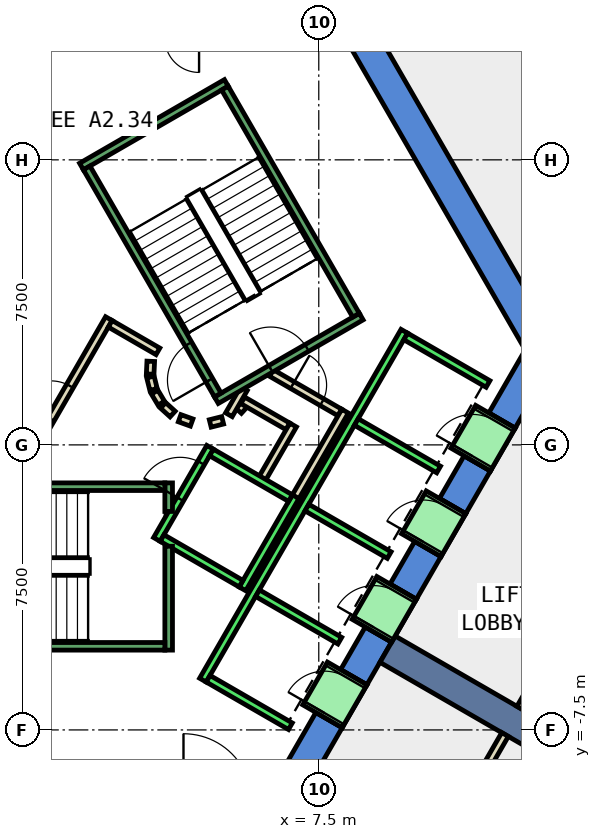
"""IFC4 building model, lengths in metres.
Left out: names, types, materials, properties, quantities, classifications, styles, units other than length and angle.
Written with IfcOpenShell. Run it as: python <this file> out.ifc"""

import sys

from ifc_helpers import new_model, si_unit, direction, frame, frame_2d, origin, place, context, subcontext, project, spatial, polyline, rectangle, outline, extrude, element, fill, save


model = new_model("IFC4")
c1 = context("Model", 3, precision=1e-05, world=origin(), true_north=direction((0.0, 1.0)))
c2 = subcontext(c1, "Body", "Model", "MODEL_VIEW")
j1 = project(units=[si_unit("LENGTHUNIT", "METRE"), si_unit("PLANEANGLEUNIT", "RADIAN")], contexts=[c1])
p1 = place(None, origin())
s1 = spatial("IfcSite", under=j1, at=p1, CompositionType="ELEMENT")
p2 = place(p1, origin())
s2 = spatial("IfcBuilding", under=s1, at=p2, CompositionType="ELEMENT")
p3 = place(p2, frame((0.0, 0.0, 167.6)))
s3 = spatial("IfcBuildingStorey", under=s2, at=p3, CompositionType="ELEMENT", Elevation=167.6)
p4 = place(p3, frame((0.0, 0.0, -0.4)))
e1 = element("IfcWall", 1, at=p4, inside=s3, PredefinedType="SHEAR", context=c2, shape_type="SweptSolid", body=[
    extrude(outline(polyline([(8.517, 11.748), (7.824, 11.348), (12.933, 2.5), (13.856, 2.5), (8.517, 11.748)])), origin(), (0.0, 0.0, 1.0), 4.2),
])
p5 = place(p3, frame((0.0, 0.0, -0.4)))
e2 = element("IfcWall", 2, at=p5, inside=s3, PredefinedType="SHEAR", context=c2, shape_type="SweptSolid", body=[
    extrude(outline(polyline([(8.117, -7.44), (7.424, -7.04), (6.466, -8.7), (6.928, -9.5), (8.117, -7.44)])), origin(), (0.0, 0.0, 1.0), 4.2),
])
p6 = place(p3, frame((0.0, 0.0, -0.4)))
e3 = element("IfcWall", 3, at=p6, inside=s3, PredefinedType="SHEAR", context=c2, shape_type="SweptSolid", body=[
    extrude(outline(polyline([(9.417, -5.189), (8.724, -4.789), (8.075, -5.914), (8.767, -6.314), (9.417, -5.189)])), origin(), (0.0, 0.0, 1.0), 4.2),
])
p7 = place(p3, frame((0.0, 0.0, -0.4)))
e4 = element("IfcWall", 4, at=p7, inside=s3, PredefinedType="SHEAR", context=c2, shape_type="SweptSolid", body=[
    extrude(outline(polyline([(10.717, -2.937), (10.025, -2.537), (9.374, -3.663), (10.067, -4.063), (10.717, -2.937)])), origin(), (0.0, 0.0, 1.0), 4.2),
])
p8 = place(p3, frame((0.0, 0.0, -0.4)))
e5 = element("IfcWall", 5, at=p8, inside=s3, PredefinedType="SHEAR", context=c2, shape_type="SweptSolid", body=[
    extrude(outline(polyline([(12.017, -0.686), (11.324, -0.286), (10.675, -1.411), (11.367, -1.811), (12.017, -0.686)])), origin(), (0.0, 0.0, 1.0), 4.2),
])
p9 = place(p3, frame((0.0, 0.0, -0.4)))
e6 = element("IfcWall", 6, at=p9, inside=s3, PredefinedType="SHEAR", context=c2, shape_type="SweptSolid", body=[
    extrude(outline(polyline([(11.974, 0.84), (12.667, 0.44), (13.856, 2.5), (12.933, 2.5), (11.974, 0.84)])), origin(), (0.0, 0.0, 1.0), 4.2),
])
p10 = place(p3, frame((0.0, 0.0, 3.6)))
e7 = element("IfcWall", 7, at=p10, inside=s3, PredefinedType="SHEAR", context=c2, shape_type="SweptSolid", body=[
    extrude(outline(polyline([(8.767, -6.314), (8.075, -5.914), (7.424, -7.04), (8.117, -7.44), (8.767, -6.314)])), origin(), (0.0, 0.0, 1.0), 0.2),
])
p11 = place(p3, frame((0.0, 0.0, 3.6)))
e8 = element("IfcWall", 8, at=p11, inside=s3, PredefinedType="SHEAR", context=c2, shape_type="SweptSolid", body=[
    extrude(outline(polyline([(10.067, -4.063), (9.374, -3.663), (8.724, -4.789), (9.417, -5.189), (10.067, -4.063)])), origin(), (0.0, 0.0, 1.0), 0.2),
])
p12 = place(p3, frame((0.0, 0.0, 3.6)))
e9 = element("IfcWall", 9, at=p12, inside=s3, PredefinedType="SHEAR", context=c2, shape_type="SweptSolid", body=[
    extrude(outline(polyline([(11.367, -1.811), (10.675, -1.411), (10.025, -2.537), (10.717, -2.937), (11.367, -1.811)])), origin(), (0.0, 0.0, 1.0), 0.2),
])
p13 = place(p3, frame((0.0, 0.0, 3.6)))
e10 = element("IfcWall", 10, at=p13, inside=s3, PredefinedType="SHEAR", context=c2, shape_type="SweptSolid", body=[
    extrude(outline(polyline([(12.667, 0.44), (11.974, 0.84), (11.324, -0.286), (12.017, -0.686), (12.667, 0.44)])), origin(), (0.0, 0.0, 1.0), 0.2),
])
p14 = place(p3, frame((9.31, -5.375, -0.4), z_axis=(0.0, 0.0, 1.0), x_axis=(0.866017533419, -0.500013631625, 0.0)))
e11 = element("IfcWall", 11, at=p14, inside=s3, PredefinedType="SHEAR", context=c2, shape_type="SweptSolid", body=[
    extrude(rectangle(XDim=9.0, YDim=0.8, at=frame_2d((4.5, 0.0))), origin(), (0.0, 0.0, 1.0), 4.2),
])
p15 = place(p3, frame((5.39, 0.898, 0.0), z_axis=(0.0, 0.0, 1.0), x_axis=(0.673828488714, 0.738887791073, 0.0)))
e12 = element("IfcWall", 12, at=p15, inside=s3, PredefinedType="PARTITIONING", context=c2, shape_type="SweptSolid", body=[
    extrude(rectangle(XDim=0.263, YDim=0.2, at=frame_2d((0.131, 0.0))), origin(), (0.0, 0.0, 1.0), 3.8),
])
p16 = place(p3, frame((5.499, 1.172, 0.0), z_axis=(0.0, 0.0, 1.0), x_axis=(0.866333505267, -0.499465972466, 0.0)))
e13 = element("IfcWall", 13, at=p16, inside=s3, PredefinedType="PARTITIONING", context=c2, shape_type="SweptSolid", body=[
    extrude(rectangle(XDim=1.374, YDim=0.2, at=frame_2d((0.687, 0.0))), origin(), (0.0, 0.0, 1.0), 3.8),
])
p17 = place(p3, frame((6.826, 0.522, 0.0), z_axis=(0.0, 0.0, 1.0), x_axis=(-0.500016722714, -0.866015748706, 0.0)))
e14 = element("IfcWall", 14, at=p17, inside=s3, PredefinedType="PARTITIONING", context=c2, shape_type="SweptSolid", body=[
    extrude(rectangle(XDim=1.7, YDim=0.2, at=frame_2d((0.85, 0.0))), origin(), (0.0, 0.0, 1.0), 3.8),
])
p18 = place(p3, frame((6.25, 1.894, 0.0), z_axis=(0.0, 0.0, 1.0), x_axis=(0.866043184279, -0.499969202016, 0.0)))
e15 = element("IfcWall", 15, at=p18, inside=s3, PredefinedType="PARTITIONING", context=c2, shape_type="SweptSolid", body=[
    extrude(rectangle(XDim=2.084, YDim=0.2, at=frame_2d((1.042, 0.0))), origin(), (0.0, 0.0, 1.0), 3.8),
])
p19 = place(p18, frame((0.642, 0.0, 0.0)))
e16 = element("IfcOpeningElement", 16, at=p19, cuts=e15, PredefinedType="OPENING", context=c2, shape_type="SweptSolid", body=[
    extrude(rectangle(XDim=0.9, YDim=2.1, at=frame_2d((0.45, 1.05))), frame((0.0, 0.11, 0.0), z_axis=(0.0, -1.0, 0.0), x_axis=(1.0, 0.0, 0.0)), (0.0, 0.0, 1.0), 0.22),
])
p20 = place(p3, frame((8.192, 0.888, 0.0), z_axis=(0.0, 0.0, 1.0), x_axis=(-0.499940625693, -0.866059680843, 0.0)))
e17 = element("IfcWall", 17, at=p20, inside=s3, PredefinedType="PARTITIONING", context=c2, shape_type="SweptSolid", body=[
    extrude(rectangle(XDim=2.68, YDim=0.2, at=frame_2d((1.34, 0.0))), origin(), (0.0, 0.0, 1.0), 3.8),
])
p21 = place(p3, frame((5.135, 0.793, 0.0), z_axis=(0.0, 0.0, 1.0), x_axis=(0.499526442893, 0.866298639529, 0.0)))
e18 = element("IfcWall", 18, at=p21, inside=s3, PredefinedType="PARTITIONING", context=c2, shape_type="SweptSolid", body=[
    extrude(rectangle(XDim=0.791, YDim=0.2, at=frame_2d((0.396, 0.0))), origin(), (0.0, 0.0, 1.0), 3.8),
])
p22 = place(p3, frame((-0.52, -1.0, 0.0), z_axis=(0.0, 0.0, 1.0), x_axis=(0.50011622646, 0.865958290007, 0.0)))
e19 = element("IfcWall", 19, at=p22, inside=s3, PredefinedType="PARTITIONING", context=c2, shape_type="SweptSolid", body=[
    extrude(rectangle(XDim=4.991, YDim=0.2, at=frame_2d((2.496, 0.0))), origin(), (0.0, 0.0, 1.0), 3.8),
])
p23 = place(p22, frame((1.945, 0.0, 0.0)))
e20 = element("IfcOpeningElement", 20, at=p23, cuts=e19, PredefinedType="OPENING", context=c2, shape_type="SweptSolid", body=[
    extrude(rectangle(XDim=1.0, YDim=2.1, at=frame_2d((0.5, 1.05))), frame((0.0, 0.11, 0.0), z_axis=(0.0, -1.0, 0.0), x_axis=(1.0, 0.0, 0.0)), (0.0, 0.0, 1.0), 0.22),
])
p24 = place(p3, frame((2.012, 3.186, 0.0), z_axis=(0.0, 0.0, 1.0), x_axis=(0.865891012941, -0.500232699559, 0.0)))
e21 = element("IfcWall", 21, at=p24, inside=s3, PredefinedType="PARTITIONING", context=c2, shape_type="SweptSolid", body=[
    extrude(rectangle(XDim=1.449, YDim=0.2, at=frame_2d((0.725, 0.0))), origin(), (0.0, 0.0, 1.0), 3.8),
])
p25 = place(p3, frame((3.079, 2.199, 0.0), z_axis=(0.0, 0.0, 1.0), x_axis=(-0.047771483479, -0.998858290933, 0.0)))
e22 = element("IfcWall", 22, at=p25, inside=s3, PredefinedType="PARTITIONING", context=c2, shape_type="SweptSolid", body=[
    extrude(rectangle(XDim=0.337, YDim=0.2, at=frame_2d((0.169, 0.0))), origin(), (0.0, 0.0, 1.0), 3.8),
])
p26 = place(p3, frame((3.07, 1.786, 0.0), z_axis=(0.0, 0.0, 1.0), x_axis=(0.242705583207, -0.970099994784, 0.0)))
e23 = element("IfcWall", 23, at=p26, inside=s3, PredefinedType="PARTITIONING", context=c2, shape_type="SweptSolid", body=[
    extrude(rectangle(XDim=0.338, YDim=0.2, at=frame_2d((0.169, 0.0))), origin(), (0.0, 0.0, 1.0), 3.8),
])
for number, where, z_axis, x_axis in (
    (24, (3.182, 1.388, 0.0), (0.0, 0.0, 1.0), (0.512, -0.859, 0.0)),
    (25, (3.404, 1.039, 0.0), (0.0, 0.0, 1.0), (0.74, -0.672, 0.0)),
):
    element("IfcWall", number, at=place(p3, frame(where, z_axis=z_axis, x_axis=x_axis)), inside=s3, PredefinedType="PARTITIONING", context=c2, shape_type="SweptSolid", body=[
        extrude(rectangle(XDim=0.338, YDim=0.2, at=frame_2d((0.169, 0.0))), origin(), (0.0, 0.0, 1.0), 3.8),
    ])
p27 = place(p3, frame((3.838, 0.702, 0.0), z_axis=(0.0, 0.0, 1.0), x_axis=(0.941035081519, -0.338308993895, 0.0)))
e26 = element("IfcWall", 26, at=p27, inside=s3, PredefinedType="PARTITIONING", context=c2, shape_type="SweptSolid", body=[
    extrude(rectangle(XDim=0.337, YDim=0.2, at=frame_2d((0.168, 0.0))), origin(), (0.0, 0.0, 1.0), 3.8),
])
p28 = place(p3, frame((4.644, 0.564, 0.0), z_axis=(0.0, 0.0, 1.0), x_axis=(0.969929076366, 0.243387729394, 0.0)))
e27 = element("IfcWall", 27, at=p28, inside=s3, PredefinedType="PARTITIONING", context=c2, shape_type="SweptSolid", body=[
    extrude(rectangle(XDim=0.337, YDim=0.2, at=frame_2d((0.168, 0.0))), origin(), (0.0, 0.0, 1.0), 3.8),
])
p29 = place(p3, frame((18.0, 2.077, 0.0), z_axis=(0.0, 0.0, 1.0), x_axis=(-0.499959557847, -0.866048751813, 0.0)))
e28 = element("IfcWall", 28, at=p29, inside=s3, PredefinedType="PARTITIONING", context=c2, shape_type="SweptSolid", body=[
    extrude(rectangle(XDim=10.399, YDim=0.2, at=frame_2d((5.199, 0.0))), origin(), (0.0, 0.0, 1.0), 3.8),
])
p30 = place(p3, frame((12.401, -7.621, 0.0), z_axis=(0.0, 0.0, 1.0), x_axis=(-0.499983724212, -0.866034800411, 0.0)))
e29 = element("IfcWall", 29, at=p30, inside=s3, PredefinedType="PARTITIONING", context=c2, shape_type="SweptSolid", body=[
    extrude(rectangle(XDim=9.302, YDim=0.2, at=frame_2d((4.651, 0.0))), origin(), (0.0, 0.0, 1.0), 3.8),
])
p31 = place(p3, frame((3.24, -2.488, 0.0), z_axis=(0.0, 0.0, 1.0), x_axis=(0.49994636267, 0.866056369097, 0.0)))
e30 = element("IfcWall", 30, at=p31, inside=s3, PredefinedType="STANDARD", context=c2, shape_type="SweptSolid", body=[
    extrude(rectangle(XDim=2.8, YDim=0.2, at=frame_2d((1.4, 0.0))), origin(), (0.0, 0.0, 1.0), 3.8),
])
p32 = place(p31, frame((1.225, 0.0, 0.0)))
e31 = element("IfcOpeningElement", 31, at=p32, cuts=e30, PredefinedType="OPENING", context=c2, shape_type="SweptSolid", body=[
    extrude(rectangle(XDim=1.1, YDim=2.1, at=frame_2d((0.55, 1.05))), frame((0.0, 0.11, 0.0), z_axis=(0.0, -1.0, 0.0), x_axis=(1.0, 0.0, 0.0)), (0.0, 0.0, 1.0), 0.22),
])
p33 = place(p3, frame((5.492, -3.788, 0.0), z_axis=(0.0, 0.0, 1.0), x_axis=(0.500011755427, 0.866018616679, 0.0)))
e32 = element("IfcWall", 32, at=p33, inside=s3, PredefinedType="STANDARD", context=c2, shape_type="SweptSolid", body=[
    extrude(rectangle(XDim=2.8, YDim=0.2, at=frame_2d((1.4, 0.0))), origin(), (0.0, 0.0, 1.0), 3.8),
])
p34 = place(p3, frame((3.377, -2.452, 0.0), z_axis=(0.0, 0.0, 1.0), x_axis=(0.865955154139, -0.50012165622, 0.0)))
e33 = element("IfcWall", 33, at=p34, inside=s3, PredefinedType="STANDARD", context=c2, shape_type="SweptSolid", body=[
    extrude(rectangle(XDim=2.4, YDim=0.2, at=frame_2d((1.2, 0.0))), origin(), (0.0, 0.0, 1.0), 3.8),
])
p35 = place(p3, frame((4.677, -0.2, 0.0), z_axis=(0.0, 0.0, 1.0), x_axis=(0.865973769406, -0.500089422704, 0.0)))
e34 = element("IfcWall", 34, at=p35, inside=s3, PredefinedType="STANDARD", context=c2, shape_type="SweptSolid", body=[
    extrude(rectangle(XDim=2.399, YDim=0.2, at=frame_2d((1.2, 0.0))), origin(), (0.0, 0.0, 1.0), 3.8),
])
p36 = place(p3, frame((4.451, -6.19, 0.0), z_axis=(0.0, 0.0, 1.0), x_axis=(0.50000090737, 0.866024879913, 0.0)))
e35 = element("IfcWall", 35, at=p36, inside=s3, PredefinedType="STANDARD", context=c2, shape_type="SweptSolid", body=[
    extrude(rectangle(XDim=10.6, YDim=0.2, at=frame_2d((5.3, 0.0))), origin(), (0.0, 0.0, 1.0), 3.8),
])
for number, where, z_axis, x_axis in (
    (36, (4.588, -6.153, 0.0), (0.0, 0.0, 1.0), (0.866, -0.5, 0.0)),
    (37, (5.888, -3.902, 0.0), (0.0, 0.0, 1.0), (0.866, -0.5, 0.0)),
    (38, (7.188, -1.65, 0.0), (0.0, 0.0, 1.0), (0.866, -0.5, 0.0)),
    (39, (8.488, 0.602, 0.0), (0.0, 0.0, 1.0), (0.866, -0.5, 0.0)),
):
    element("IfcWall", number, at=place(p3, frame(where, z_axis=z_axis, x_axis=x_axis)), inside=s3, PredefinedType="STANDARD", context=c2, shape_type="SweptSolid", body=[
        extrude(rectangle(XDim=2.5, YDim=0.2, at=frame_2d((1.25, 0.0))), origin(), (0.0, 0.0, 1.0), 3.8),
    ])
p37 = place(p3, frame((9.788, 2.853, 0.0), z_axis=(0.0, 0.0, 1.0), x_axis=(0.865998541277, -0.500046524342, 0.0)))
e40 = element("IfcWall", 40, at=p37, inside=s3, PredefinedType="STANDARD", context=c2, shape_type="SweptSolid", body=[
    extrude(rectangle(XDim=2.5, YDim=0.2, at=frame_2d((1.25, 0.0))), origin(), (0.0, 0.0, 1.0), 3.8),
])
p38 = place(p3, frame((7.598, -7.14, 0.0), z_axis=(0.0, 0.0, 1.0), x_axis=(0.500362116554, 0.865816234728, 0.0)))
e41 = element("IfcWall", 41, at=p38, inside=s3, PredefinedType="STANDARD", context=c2, shape_type="SweptSolid", body=[
    extrude(rectangle(XDim=1.299, YDim=1.2, at=frame_2d((0.65, 0.0))), origin(), (0.0, 0.0, 1.0), 2.4),
])
p39 = place(p38, frame((0.1, 0.0, 0.0)))
e42 = element("IfcOpeningElement", 42, at=p39, cuts=e41, PredefinedType="OPENING", context=c2, shape_type="SweptSolid", body=[
    extrude(rectangle(XDim=1.1, YDim=2.3, at=frame_2d((0.55, 1.15))), frame((0.0, 0.61, 0.0), z_axis=(0.0, -1.0, 0.0), x_axis=(1.0, 0.0, 0.0)), (0.0, 0.0, 1.0), 1.22),
])
p40 = place(p3, frame((8.898, -4.889, 0.0), z_axis=(0.0, 0.0, 1.0), x_axis=(0.500036693733, 0.866004217611, 0.0)))
e43 = element("IfcWall", 43, at=p40, inside=s3, PredefinedType="STANDARD", context=c2, shape_type="SweptSolid", body=[
    extrude(rectangle(XDim=1.3, YDim=1.2, at=frame_2d((0.65, 0.0))), origin(), (0.0, 0.0, 1.0), 2.4),
])
p41 = place(p40, frame((0.1, 0.0, 0.0)))
e44 = element("IfcOpeningElement", 44, at=p41, cuts=e43, PredefinedType="OPENING", context=c2, shape_type="SweptSolid", body=[
    extrude(rectangle(XDim=1.1, YDim=2.3, at=frame_2d((0.55, 1.15))), frame((0.0, 0.61, 0.0), z_axis=(0.0, -1.0, 0.0), x_axis=(1.0, 0.0, 0.0)), (0.0, 0.0, 1.0), 1.22),
])
p42 = place(p3, frame((10.198, -2.637, 0.0), z_axis=(0.0, 0.0, 1.0), x_axis=(0.49989585183, 0.866085525409, 0.0)))
e45 = element("IfcWall", 45, at=p42, inside=s3, PredefinedType="STANDARD", context=c2, shape_type="SweptSolid", body=[
    extrude(rectangle(XDim=1.3, YDim=1.2, at=frame_2d((0.65, 0.0))), origin(), (0.0, 0.0, 1.0), 2.4),
])
p43 = place(p42, frame((0.1, 0.0, 0.0)))
e46 = element("IfcOpeningElement", 46, at=p43, cuts=e45, PredefinedType="OPENING", context=c2, shape_type="SweptSolid", body=[
    extrude(rectangle(XDim=1.1, YDim=2.3, at=frame_2d((0.55, 1.15))), frame((0.0, 0.61, 0.0), z_axis=(0.0, -1.0, 0.0), x_axis=(1.0, 0.0, 0.0)), (0.0, 0.0, 1.0), 1.22),
])
p44 = place(p3, frame((11.498, -0.385, 0.0), z_axis=(0.0, 0.0, 1.0), x_axis=(0.500221244143, 0.865897630733, 0.0)))
e47 = element("IfcWall", 47, at=p44, inside=s3, PredefinedType="STANDARD", context=c2, shape_type="SweptSolid", body=[
    extrude(rectangle(XDim=1.299, YDim=1.2, at=frame_2d((0.65, 0.0))), origin(), (0.0, 0.0, 1.0), 2.4),
])
p45 = place(p44, frame((0.1, 0.0, 0.0)))
e48 = element("IfcOpeningElement", 48, at=p45, cuts=e47, PredefinedType="OPENING", context=c2, shape_type="SweptSolid", body=[
    extrude(rectangle(XDim=1.1, YDim=2.3, at=frame_2d((0.55, 1.15))), frame((0.0, 0.61, 0.0), z_axis=(0.0, -1.0, 0.0), x_axis=(1.0, 0.0, 0.0)), (0.0, 0.0, 1.0), 1.22),
])
p46 = place(p3, frame((3.55, -2.667, 0.0), z_axis=(0.0, 0.0, 1.0), x_axis=(0.0, -1.0, 0.0)))
e49 = element("IfcWall", 49, at=p46, inside=s3, PredefinedType="STANDARD", context=c2, shape_type="SweptSolid", body=[
    extrude(rectangle(XDim=2.733, YDim=0.2, at=frame_2d((1.366, 0.0))), origin(), (0.0, 0.0, 1.0), 3.8),
])
p47 = place(p3, frame((3.55, -1.0, 0.0), z_axis=(0.0, 0.0, 1.0), x_axis=(0.0, -1.0, 0.0)))
e50 = element("IfcWall", 50, at=p47, inside=s3, PredefinedType="STANDARD", context=c2, shape_type="SweptSolid", body=[
    extrude(rectangle(XDim=0.751, YDim=0.2, at=frame_2d((0.375, 0.0))), origin(), (0.0, 0.0, 1.0), 3.8),
])
p48 = place(p3, frame((-3.45, -1.1, 0.0), z_axis=(0.0, 0.0, 1.0), x_axis=(1.0, 0.0, 0.0)))
e51 = element("IfcWall", 51, at=p48, inside=s3, PredefinedType="STANDARD", context=c2, shape_type="SweptSolid", body=[
    extrude(rectangle(XDim=6.9, YDim=0.2, at=frame_2d((3.45, 0.0))), origin(), (0.0, 0.0, 1.0), 3.8),
])
p49 = place(p48, frame((0.45, 0.0, 0.0)))
e52 = element("IfcOpeningElement", 52, at=p49, cuts=e51, PredefinedType="OPENING", context=c2, shape_type="SweptSolid", body=[
    extrude(rectangle(XDim=1.1, YDim=2.2, at=frame_2d((0.55, 1.1))), frame((0.0, 0.11, 0.0), z_axis=(0.0, -1.0, 0.0), x_axis=(1.0, 0.0, 0.0)), (0.0, 0.0, 1.0), 0.22),
])
p50 = place(p3, frame((-3.45, -5.3, 0.0), z_axis=(0.0, 0.0, 1.0), x_axis=(1.0, 0.0, 0.0)))
e53 = element("IfcWall", 53, at=p50, inside=s3, PredefinedType="STANDARD", context=c2, shape_type="SweptSolid", body=[
    extrude(rectangle(XDim=6.9, YDim=0.2, at=frame_2d((3.45, 0.0))), origin(), (0.0, 0.0, 1.0), 3.8),
])
p51 = place(p3, frame((4.806, 1.176, 0.0), z_axis=(0.0, 0.0, 1.0), x_axis=(0.866059941101, 0.499940174841, 0.0)))
e54 = element("IfcWall", 54, at=p51, inside=s3, PredefinedType="STANDARD", context=c2, shape_type="SweptSolid", body=[
    extrude(rectangle(XDim=4.4, YDim=0.2, at=frame_2d((2.2, 0.0))), origin(), (0.0, 0.0, 1.0), 3.8),
])
p52 = place(p51, frame((1.65, 0.0, 0.0)))
e55 = element("IfcOpeningElement", 55, at=p52, cuts=e54, PredefinedType="OPENING", context=c2, shape_type="SweptSolid", body=[
    extrude(rectangle(XDim=1.1, YDim=2.2, at=frame_2d((0.55, 1.1))), frame((0.0, 0.11, 0.0), z_axis=(0.0, -1.0, 0.0), x_axis=(1.0, 0.0, 0.0)), (0.0, 0.0, 1.0), 0.22),
])
p53 = place(p3, frame((1.256, 7.324, 0.0), z_axis=(0.0, 0.0, 1.0), x_axis=(0.866046073146, 0.499964197906, 0.0)))
e56 = element("IfcWall", 56, at=p53, inside=s3, PredefinedType="STANDARD", context=c2, shape_type="SweptSolid", body=[
    extrude(rectangle(XDim=4.4, YDim=0.2, at=frame_2d((2.2, 0.0))), origin(), (0.0, 0.0, 1.0), 3.8),
])
p54 = place(p3, frame((4.843, 1.312, 0.0), z_axis=(0.0, 0.0, 1.0), x_axis=(-0.499963383562, 0.866046543262, 0.0)))
e57 = element("IfcWall", 57, at=p54, inside=s3, PredefinedType="STANDARD", context=c2, shape_type="SweptSolid", body=[
    extrude(rectangle(XDim=6.9, YDim=0.2, at=frame_2d((3.45, 0.0))), origin(), (0.0, 0.0, 1.0), 3.8),
])
p55 = place(p54, frame((0.45, 0.0, 0.0)))
e58 = element("IfcOpeningElement", 58, at=p55, cuts=e57, PredefinedType="OPENING", context=c2, shape_type="SweptSolid", body=[
    extrude(rectangle(XDim=1.1, YDim=2.2, at=frame_2d((0.55, 1.1))), frame((0.0, 0.11, 0.0), z_axis=(0.0, -1.0, 0.0), x_axis=(1.0, 0.0, 0.0)), (0.0, 0.0, 1.0), 0.22),
])
p56 = place(p3, frame((8.48, 3.412, 0.0), z_axis=(0.0, 0.0, 1.0), x_axis=(-0.499978703459, 0.866037698999, 0.0)))
e59 = element("IfcWall", 59, at=p56, inside=s3, PredefinedType="STANDARD", context=c2, shape_type="SweptSolid", body=[
    extrude(rectangle(XDim=6.9, YDim=0.2, at=frame_2d((3.45, 0.0))), origin(), (0.0, 0.0, 1.0), 3.8),
])
p57 = place(p23, origin())
e60 = element("IfcDoor", 60, at=p57, inside=s3, OperationType="SINGLE_SWING_LEFT", PredefinedType="DOOR", context=c2, shape_type="SweptSolid", body=[
    extrude(rectangle(XDim=1.0, YDim=2.1, at=frame_2d((0.5, 1.05))), frame((0.0, 0.025, 0.0), z_axis=(0.0, -1.0, 0.0), x_axis=(1.0, 0.0, 0.0)), (0.0, 0.0, 1.0), 0.05),
])
fill(e20, e60)
p58 = place(p19, origin())
e61 = element("IfcDoor", 61, at=p58, inside=s3, OperationType="SINGLE_SWING_LEFT", PredefinedType="DOOR", context=c2, shape_type="SweptSolid", body=[
    extrude(rectangle(XDim=0.9, YDim=2.1, at=frame_2d((0.45, 1.05))), frame((0.0, 0.025, 0.0), z_axis=(0.0, -1.0, 0.0), x_axis=(1.0, 0.0, 0.0)), (0.0, 0.0, 1.0), 0.05),
])
fill(e16, e61)
p59 = place(p39, origin())
e62 = element("IfcDoor", 62, at=p59, inside=s3, OperationType="SLIDING_TO_LEFT", PredefinedType="DOOR", context=c2, shape_type="SweptSolid", body=[
    extrude(rectangle(XDim=1.1, YDim=2.3, at=frame_2d((0.55, 1.15))), frame((0.0, 0.025, 0.0), z_axis=(0.0, -1.0, 0.0), x_axis=(1.0, 0.0, 0.0)), (0.0, 0.0, 1.0), 0.05),
])
fill(e42, e62)
p60 = place(p41, origin())
e63 = element("IfcDoor", 63, at=p60, inside=s3, OperationType="SLIDING_TO_LEFT", PredefinedType="DOOR", context=c2, shape_type="SweptSolid", body=[
    extrude(rectangle(XDim=1.1, YDim=2.3, at=frame_2d((0.55, 1.15))), frame((0.0, 0.025, 0.0), z_axis=(0.0, -1.0, 0.0), x_axis=(1.0, 0.0, 0.0)), (0.0, 0.0, 1.0), 0.05),
])
fill(e44, e63)
p61 = place(p43, origin())
e64 = element("IfcDoor", 64, at=p61, inside=s3, OperationType="SLIDING_TO_LEFT", PredefinedType="DOOR", context=c2, shape_type="SweptSolid", body=[
    extrude(rectangle(XDim=1.1, YDim=2.3, at=frame_2d((0.55, 1.15))), frame((0.0, 0.025, 0.0), z_axis=(0.0, -1.0, 0.0), x_axis=(1.0, 0.0, 0.0)), (0.0, 0.0, 1.0), 0.05),
])
fill(e46, e64)
p62 = place(p45, origin())
e65 = element("IfcDoor", 65, at=p62, inside=s3, OperationType="SLIDING_TO_LEFT", PredefinedType="DOOR", context=c2, shape_type="SweptSolid", body=[
    extrude(rectangle(XDim=1.1, YDim=2.3, at=frame_2d((0.55, 1.15))), frame((0.0, 0.025, 0.0), z_axis=(0.0, -1.0, 0.0), x_axis=(1.0, 0.0, 0.0)), (0.0, 0.0, 1.0), 0.05),
])
fill(e48, e65)
p63 = place(p32, origin())
e66 = element("IfcDoor", 66, at=p63, inside=s3, OperationType="SLIDING_TO_LEFT", PredefinedType="DOOR", context=c2, shape_type="SweptSolid", body=[
    extrude(rectangle(XDim=1.1, YDim=2.1, at=frame_2d((0.55, 1.05))), frame((0.0, 0.025, 0.0), z_axis=(0.0, -1.0, 0.0), x_axis=(1.0, 0.0, 0.0)), (0.0, 0.0, 1.0), 0.05),
])
fill(e31, e66)
p64 = place(p55, origin())
e67 = element("IfcDoor", 67, at=p64, inside=s3, OperationType="SINGLE_SWING_LEFT", PredefinedType="DOOR", context=c2, shape_type="SweptSolid", body=[
    extrude(rectangle(XDim=1.1, YDim=2.2, at=frame_2d((0.55, 1.1))), frame((0.0, 0.025, 0.0), z_axis=(0.0, -1.0, 0.0), x_axis=(1.0, 0.0, 0.0)), (0.0, 0.0, 1.0), 0.05),
])
fill(e58, e67)
p65 = place(p52, origin())
e68 = element("IfcDoor", 68, at=p65, inside=s3, OperationType="SINGLE_SWING_LEFT", PredefinedType="DOOR", context=c2, shape_type="SweptSolid", body=[
    extrude(rectangle(XDim=1.1, YDim=2.2, at=frame_2d((0.55, 1.1))), frame((0.0, 0.025, 0.0), z_axis=(0.0, -1.0, 0.0), x_axis=(1.0, 0.0, 0.0)), (0.0, 0.0, 1.0), 0.05),
])
fill(e55, e68)
save(model, sys.argv[1])
